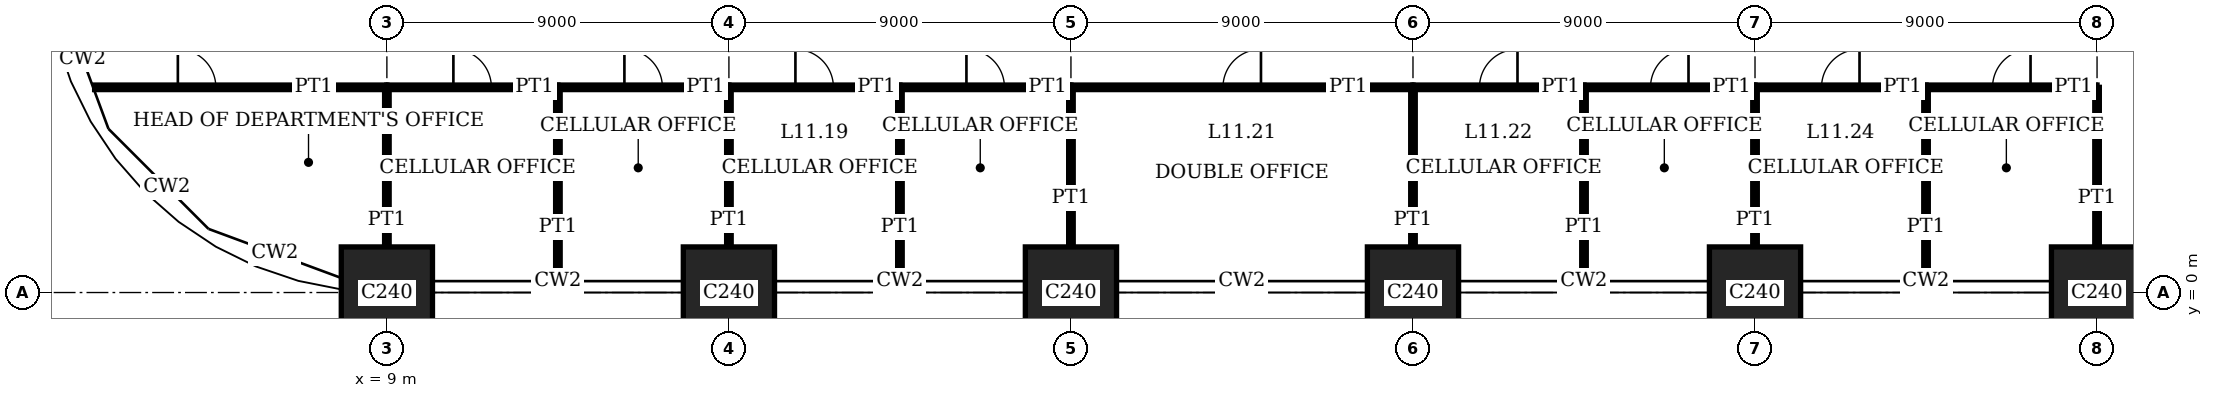
"""IFC4 building model, lengths in metres.
Left out: names, types, materials, properties, quantities, classifications, styles, units other than length and angle.
Written with IfcOpenShell. Run it as: python <this file> out.ifc"""

import sys

from ifc_helpers import new_model, si_unit, direction, frame, frame_2d, origin, origin_2d, place, context, subcontext, project, spatial, rectangle, extrude, element, fill, save


model = new_model("IFC4")
c1 = context("Model", 3, precision=1e-05, world=origin(), true_north=direction((0.0, 1.0)))
c2 = subcontext(c1, "Body", "Model", "MODEL_VIEW")
j1 = project(units=[si_unit("LENGTHUNIT", "METRE"), si_unit("PLANEANGLEUNIT", "RADIAN")], contexts=[c1])
p1 = place(None, origin())
s1 = spatial("IfcSite", under=j1, at=p1, CompositionType="ELEMENT")
p2 = place(p1, origin())
s2 = spatial("IfcBuilding", under=s1, at=p2, CompositionType="ELEMENT")
p3 = place(p2, frame((0.0, 0.0, 47.8)))
s3 = spatial("IfcBuildingStorey", under=s2, at=p3, CompositionType="ELEMENT", Elevation=47.8)
for number, where, z_axis, x_axis in (
    (1, (9.0, 0.0, 0.0), (0.0, 0.0, 1.0), (1.0, 0.0, 0.0)),
    (2, (18.0, 0.0, 0.0), (0.0, 0.0, 1.0), (1.0, 0.0, 0.0)),
    (3, (27.0, 0.0, 0.0), (0.0, 0.0, 1.0), (1.0, 0.0, 0.0)),
    (4, (36.0, 0.0, 0.0), (0.0, 0.0, 1.0), (1.0, 0.0, 0.0)),
    (5, (45.0, 0.0, 0.0), (0.0, 0.0, 1.0), (1.0, 0.0, 0.0)),
    (6, (54.0, 0.0, 0.0), (0.0, 0.0, 1.0), (1.0, 0.0, 0.0)),
):
    element("IfcColumn", number, at=place(p3, frame(where, z_axis=z_axis, x_axis=x_axis)), inside=s3, PredefinedType="COLUMN", context=c2, shape_type="SweptSolid", body=[
        extrude(rectangle(XDim=2.4, YDim=2.4, at=origin_2d()), origin(), (0.0, 0.0, 1.0), 4.0),
    ])
p4 = place(p3, frame((9.0, 5.4, 0.0), z_axis=(0.0, 0.0, 1.0), x_axis=(1.0, 0.0, 0.0)))
e7 = element("IfcWall", 7, at=p4, inside=s3, PredefinedType="PARTITIONING", context=c2, shape_type="SweptSolid", body=[
    extrude(rectangle(XDim=4.5, YDim=0.12, at=frame_2d((2.25, 0.0))), origin(), (0.0, 0.0, 1.0), 3.75),
])
p5 = place(p4, frame((1.75, 0.0, 0.0)))
e8 = element("IfcOpeningElement", 8, at=p5, cuts=e7, PredefinedType="OPENING", context=c2, shape_type="SweptSolid", body=[
    extrude(rectangle(XDim=1.0, YDim=2.4, at=frame_2d((0.5, 1.2))), frame((0.0, 0.07, 0.0), z_axis=(0.0, -1.0, 0.0), x_axis=(1.0, 0.0, 0.0)), (0.0, 0.0, 1.0), 0.14),
])
p6 = place(p3, frame((13.5, 5.4, 0.0), z_axis=(0.0, 0.0, 1.0), x_axis=(1.0, 0.0, 0.0)))
e9 = element("IfcWall", 9, at=p6, inside=s3, PredefinedType="PARTITIONING", context=c2, shape_type="SweptSolid", body=[
    extrude(rectangle(XDim=4.5, YDim=0.12, at=frame_2d((2.25, 0.0))), origin(), (0.0, 0.0, 1.0), 3.75),
])
p7 = place(p6, frame((1.75, 0.0, 0.0)))
e10 = element("IfcOpeningElement", 10, at=p7, cuts=e9, PredefinedType="OPENING", context=c2, shape_type="SweptSolid", body=[
    extrude(rectangle(XDim=1.0, YDim=2.4, at=frame_2d((0.5, 1.2))), frame((0.0, 0.07, 0.0), z_axis=(0.0, -1.0, 0.0), x_axis=(1.0, 0.0, 0.0)), (0.0, 0.0, 1.0), 0.14),
])
p8 = place(p3, frame((18.0, 5.4, 0.0), z_axis=(0.0, 0.0, 1.0), x_axis=(1.0, 0.0, 0.0)))
e11 = element("IfcWall", 11, at=p8, inside=s3, PredefinedType="PARTITIONING", context=c2, shape_type="SweptSolid", body=[
    extrude(rectangle(XDim=4.5, YDim=0.12, at=frame_2d((2.25, 0.0))), origin(), (0.0, 0.0, 1.0), 3.75),
])
p9 = place(p8, frame((1.75, 0.0, 0.0)))
e12 = element("IfcOpeningElement", 12, at=p9, cuts=e11, PredefinedType="OPENING", context=c2, shape_type="SweptSolid", body=[
    extrude(rectangle(XDim=1.0, YDim=2.4, at=frame_2d((0.5, 1.2))), frame((0.0, 0.07, 0.0), z_axis=(0.0, -1.0, 0.0), x_axis=(1.0, 0.0, 0.0)), (0.0, 0.0, 1.0), 0.14),
])
p10 = place(p3, frame((22.5, 5.4, 0.0), z_axis=(0.0, 0.0, 1.0), x_axis=(1.0, 0.0, 0.0)))
e13 = element("IfcWall", 13, at=p10, inside=s3, PredefinedType="PARTITIONING", context=c2, shape_type="SweptSolid", body=[
    extrude(rectangle(XDim=4.5, YDim=0.12, at=frame_2d((2.25, 0.0))), origin(), (0.0, 0.0, 1.0), 3.75),
])
p11 = place(p10, frame((1.75, 0.0, 0.0)))
e14 = element("IfcOpeningElement", 14, at=p11, cuts=e13, PredefinedType="OPENING", context=c2, shape_type="SweptSolid", body=[
    extrude(rectangle(XDim=1.0, YDim=2.4, at=frame_2d((0.5, 1.2))), frame((0.0, 0.07, 0.0), z_axis=(0.0, -1.0, 0.0), x_axis=(1.0, 0.0, 0.0)), (0.0, 0.0, 1.0), 0.14),
])
p12 = place(p3, frame((27.0, 5.4, 0.0), z_axis=(0.0, 0.0, 1.0), x_axis=(1.0, 0.0, 0.0)))
e15 = element("IfcWall", 15, at=p12, inside=s3, PredefinedType="PARTITIONING", context=c2, shape_type="SweptSolid", body=[
    extrude(rectangle(XDim=9.0, YDim=0.12, at=frame_2d((4.5, 0.0))), origin(), (0.0, 0.0, 1.0), 3.75),
])
p13 = place(p12, frame((4.0, 0.0, 0.0)))
e16 = element("IfcOpeningElement", 16, at=p13, cuts=e15, PredefinedType="OPENING", context=c2, shape_type="SweptSolid", body=[
    extrude(rectangle(XDim=1.0, YDim=2.4, at=frame_2d((0.5, 1.2))), frame((0.0, 0.07, 0.0), z_axis=(0.0, -1.0, 0.0), x_axis=(1.0, 0.0, 0.0)), (0.0, 0.0, 1.0), 0.14),
])
p14 = place(p3, frame((36.0, 5.4, 0.0), z_axis=(0.0, 0.0, 1.0), x_axis=(1.0, 0.0, 0.0)))
e17 = element("IfcWall", 17, at=p14, inside=s3, PredefinedType="PARTITIONING", context=c2, shape_type="SweptSolid", body=[
    extrude(rectangle(XDim=4.5, YDim=0.12, at=frame_2d((2.25, 0.0))), origin(), (0.0, 0.0, 1.0), 3.75),
])
p15 = place(p14, frame((1.75, 0.0, 0.0)))
e18 = element("IfcOpeningElement", 18, at=p15, cuts=e17, PredefinedType="OPENING", context=c2, shape_type="SweptSolid", body=[
    extrude(rectangle(XDim=1.0, YDim=2.4, at=frame_2d((0.5, 1.2))), frame((0.0, 0.07, 0.0), z_axis=(0.0, -1.0, 0.0), x_axis=(1.0, 0.0, 0.0)), (0.0, 0.0, 1.0), 0.14),
])
p16 = place(p3, frame((40.5, 5.4, 0.0), z_axis=(0.0, 0.0, 1.0), x_axis=(1.0, 0.0, 0.0)))
e19 = element("IfcWall", 19, at=p16, inside=s3, PredefinedType="PARTITIONING", context=c2, shape_type="SweptSolid", body=[
    extrude(rectangle(XDim=4.5, YDim=0.12, at=frame_2d((2.25, 0.0))), origin(), (0.0, 0.0, 1.0), 3.75),
])
p17 = place(p16, frame((1.75, 0.0, 0.0)))
e20 = element("IfcOpeningElement", 20, at=p17, cuts=e19, PredefinedType="OPENING", context=c2, shape_type="SweptSolid", body=[
    extrude(rectangle(XDim=1.0, YDim=2.4, at=frame_2d((0.5, 1.2))), frame((0.0, 0.07, 0.0), z_axis=(0.0, -1.0, 0.0), x_axis=(1.0, 0.0, 0.0)), (0.0, 0.0, 1.0), 0.14),
])
p18 = place(p3, frame((45.0, 5.4, 0.0), z_axis=(0.0, 0.0, 1.0), x_axis=(1.0, 0.0, 0.0)))
e21 = element("IfcWall", 21, at=p18, inside=s3, PredefinedType="PARTITIONING", context=c2, shape_type="SweptSolid", body=[
    extrude(rectangle(XDim=4.5, YDim=0.12, at=frame_2d((2.25, 0.0))), origin(), (0.0, 0.0, 1.0), 3.75),
])
p19 = place(p18, frame((1.75, 0.0, 0.0)))
e22 = element("IfcOpeningElement", 22, at=p19, cuts=e21, PredefinedType="OPENING", context=c2, shape_type="SweptSolid", body=[
    extrude(rectangle(XDim=1.0, YDim=2.4, at=frame_2d((0.5, 1.2))), frame((0.0, 0.07, 0.0), z_axis=(0.0, -1.0, 0.0), x_axis=(1.0, 0.0, 0.0)), (0.0, 0.0, 1.0), 0.14),
])
p20 = place(p3, frame((49.5, 5.4, 0.0), z_axis=(0.0, 0.0, 1.0), x_axis=(1.0, 0.0, 0.0)))
e23 = element("IfcWall", 23, at=p20, inside=s3, PredefinedType="PARTITIONING", context=c2, shape_type="SweptSolid", body=[
    extrude(rectangle(XDim=4.5, YDim=0.12, at=frame_2d((2.25, 0.0))), origin(), (0.0, 0.0, 1.0), 3.75),
])
p21 = place(p20, frame((1.75, 0.0, 0.0)))
e24 = element("IfcOpeningElement", 24, at=p21, cuts=e23, PredefinedType="OPENING", context=c2, shape_type="SweptSolid", body=[
    extrude(rectangle(XDim=1.0, YDim=2.4, at=frame_2d((0.5, 1.2))), frame((0.0, 0.07, 0.0), z_axis=(0.0, -1.0, 0.0), x_axis=(1.0, 0.0, 0.0)), (0.0, 0.0, 1.0), 0.14),
])
p22 = place(p3, frame((1.31, 5.4, 0.0), z_axis=(0.0, 0.0, 1.0), x_axis=(1.0, 0.0, 0.0)))
e25 = element("IfcWall", 25, at=p22, inside=s3, PredefinedType="PARTITIONING", context=c2, shape_type="SweptSolid", body=[
    extrude(rectangle(XDim=7.69, YDim=0.12, at=frame_2d((3.845, 0.0))), origin(), (0.0, 0.0, 1.0), 3.75),
])
p23 = place(p22, frame((2.19, 0.0, 0.0)))
e26 = element("IfcOpeningElement", 26, at=p23, cuts=e25, PredefinedType="OPENING", context=c2, shape_type="SweptSolid", body=[
    extrude(rectangle(XDim=1.0, YDim=2.4, at=frame_2d((0.5, 1.2))), frame((0.0, 0.07, 0.0), z_axis=(0.0, -1.0, 0.0), x_axis=(1.0, 0.0, 0.0)), (0.0, 0.0, 1.0), 0.14),
])
p24 = place(p3, frame((9.0, 1.2, 0.0), z_axis=(0.0, 0.0, 1.0), x_axis=(0.0, 1.0, 0.0)))
e27 = element("IfcWall", 27, at=p24, inside=s3, PredefinedType="PARTITIONING", context=c2, shape_type="SweptSolid", body=[
    extrude(rectangle(XDim=4.2, YDim=0.12, at=frame_2d((2.1, 0.0))), origin(), (0.0, 0.0, 1.0), 3.05),
])
p25 = place(p3, frame((13.5, 0.31, 0.0), z_axis=(0.0, 0.0, 1.0), x_axis=(0.0, 1.0, 0.0)))
e28 = element("IfcWall", 28, at=p25, inside=s3, PredefinedType="PARTITIONING", context=c2, shape_type="SweptSolid", body=[
    extrude(rectangle(XDim=5.09, YDim=0.12, at=frame_2d((2.545, 0.0))), origin(), (0.0, 0.0, 1.0), 3.75),
])
p26 = place(p3, frame((18.0, 1.2, 0.0), z_axis=(0.0, 0.0, 1.0), x_axis=(0.0, 1.0, 0.0)))
e29 = element("IfcWall", 29, at=p26, inside=s3, PredefinedType="PARTITIONING", context=c2, shape_type="SweptSolid", body=[
    extrude(rectangle(XDim=4.2, YDim=0.12, at=frame_2d((2.1, 0.0))), origin(), (0.0, 0.0, 1.0), 3.05),
])
p27 = place(p3, frame((22.5, 0.31, 0.0), z_axis=(0.0, 0.0, 1.0), x_axis=(0.0, 1.0, 0.0)))
e30 = element("IfcWall", 30, at=p27, inside=s3, PredefinedType="PARTITIONING", context=c2, shape_type="SweptSolid", body=[
    extrude(rectangle(XDim=5.09, YDim=0.12, at=frame_2d((2.545, 0.0))), origin(), (0.0, 0.0, 1.0), 3.75),
])
for number, where, z_axis, x_axis in (
    (31, (27.0, 1.2, 0.0), (0.0, 0.0, 1.0), (0.0, 1.0, 0.0)),
    (32, (36.0, 1.2, 0.0), (0.0, 0.0, 1.0), (0.0, 1.0, 0.0)),
):
    element("IfcWall", number, at=place(p3, frame(where, z_axis=z_axis, x_axis=x_axis)), inside=s3, PredefinedType="PARTITIONING", context=c2, shape_type="SweptSolid", body=[
        extrude(rectangle(XDim=4.2, YDim=0.12, at=frame_2d((2.1, 0.0))), origin(), (0.0, 0.0, 1.0), 3.05),
    ])
p28 = place(p3, frame((40.5, 0.31, 0.0), z_axis=(0.0, 0.0, 1.0), x_axis=(0.0, 1.0, 0.0)))
e33 = element("IfcWall", 33, at=p28, inside=s3, PredefinedType="PARTITIONING", context=c2, shape_type="SweptSolid", body=[
    extrude(rectangle(XDim=5.09, YDim=0.12, at=frame_2d((2.545, 0.0))), origin(), (0.0, 0.0, 1.0), 3.75),
])
p29 = place(p3, frame((45.0, 1.2, 0.0), z_axis=(0.0, 0.0, 1.0), x_axis=(0.0, 1.0, 0.0)))
e34 = element("IfcWall", 34, at=p29, inside=s3, PredefinedType="PARTITIONING", context=c2, shape_type="SweptSolid", body=[
    extrude(rectangle(XDim=4.2, YDim=0.12, at=frame_2d((2.1, 0.0))), origin(), (0.0, 0.0, 1.0), 3.05),
])
p30 = place(p3, frame((49.5, 0.31, 0.0), z_axis=(0.0, 0.0, 1.0), x_axis=(0.0, 1.0, 0.0)))
e35 = element("IfcWall", 35, at=p30, inside=s3, PredefinedType="PARTITIONING", context=c2, shape_type="SweptSolid", body=[
    extrude(rectangle(XDim=5.09, YDim=0.12, at=frame_2d((2.545, 0.0))), origin(), (0.0, 0.0, 1.0), 3.75),
])
p31 = place(p3, frame((54.0, 1.2, 0.0), z_axis=(0.0, 0.0, 1.0), x_axis=(0.0, 1.0, 0.0)))
e36 = element("IfcWall", 36, at=p31, inside=s3, PredefinedType="PARTITIONING", context=c2, shape_type="SweptSolid", body=[
    extrude(rectangle(XDim=4.2, YDim=0.12, at=frame_2d((2.1, 0.0))), origin(), (0.0, 0.0, 1.0), 3.05),
])
p32 = place(p5, origin())
e37 = element("IfcDoor", 37, at=p32, inside=s3, OperationType="SINGLE_SWING_RIGHT", PredefinedType="DOOR", context=c2, shape_type="SweptSolid", body=[
    extrude(rectangle(XDim=1.0, YDim=2.4, at=frame_2d((0.5, 1.2))), frame((0.0, 0.025, 0.0), z_axis=(0.0, -1.0, 0.0), x_axis=(1.0, 0.0, 0.0)), (0.0, 0.0, 1.0), 0.05),
])
fill(e8, e37)
p33 = place(p7, origin())
e38 = element("IfcDoor", 38, at=p33, inside=s3, OperationType="SINGLE_SWING_RIGHT", PredefinedType="DOOR", context=c2, shape_type="SweptSolid", body=[
    extrude(rectangle(XDim=1.0, YDim=2.4, at=frame_2d((0.5, 1.2))), frame((0.0, 0.025, 0.0), z_axis=(0.0, -1.0, 0.0), x_axis=(1.0, 0.0, 0.0)), (0.0, 0.0, 1.0), 0.05),
])
fill(e10, e38)
p34 = place(p9, origin())
e39 = element("IfcDoor", 39, at=p34, inside=s3, OperationType="SINGLE_SWING_RIGHT", PredefinedType="DOOR", context=c2, shape_type="SweptSolid", body=[
    extrude(rectangle(XDim=1.0, YDim=2.4, at=frame_2d((0.5, 1.2))), frame((0.0, 0.025, 0.0), z_axis=(0.0, -1.0, 0.0), x_axis=(1.0, 0.0, 0.0)), (0.0, 0.0, 1.0), 0.05),
])
fill(e12, e39)
p35 = place(p11, origin())
e40 = element("IfcDoor", 40, at=p35, inside=s3, OperationType="SINGLE_SWING_RIGHT", PredefinedType="DOOR", context=c2, shape_type="SweptSolid", body=[
    extrude(rectangle(XDim=1.0, YDim=2.4, at=frame_2d((0.5, 1.2))), frame((0.0, 0.025, 0.0), z_axis=(0.0, -1.0, 0.0), x_axis=(1.0, 0.0, 0.0)), (0.0, 0.0, 1.0), 0.05),
])
fill(e14, e40)
p36 = place(p13, origin())
e41 = element("IfcDoor", 41, at=p36, inside=s3, OperationType="SINGLE_SWING_LEFT", PredefinedType="DOOR", context=c2, shape_type="SweptSolid", body=[
    extrude(rectangle(XDim=1.0, YDim=2.4, at=frame_2d((0.5, 1.2))), frame((0.0, 0.025, 0.0), z_axis=(0.0, -1.0, 0.0), x_axis=(1.0, 0.0, 0.0)), (0.0, 0.0, 1.0), 0.05),
])
fill(e16, e41)
p37 = place(p15, origin())
e42 = element("IfcDoor", 42, at=p37, inside=s3, OperationType="SINGLE_SWING_LEFT", PredefinedType="DOOR", context=c2, shape_type="SweptSolid", body=[
    extrude(rectangle(XDim=1.0, YDim=2.4, at=frame_2d((0.5, 1.2))), frame((0.0, 0.025, 0.0), z_axis=(0.0, -1.0, 0.0), x_axis=(1.0, 0.0, 0.0)), (0.0, 0.0, 1.0), 0.05),
])
fill(e18, e42)
p38 = place(p17, origin())
e43 = element("IfcDoor", 43, at=p38, inside=s3, OperationType="SINGLE_SWING_LEFT", PredefinedType="DOOR", context=c2, shape_type="SweptSolid", body=[
    extrude(rectangle(XDim=1.0, YDim=2.4, at=frame_2d((0.5, 1.2))), frame((0.0, 0.025, 0.0), z_axis=(0.0, -1.0, 0.0), x_axis=(1.0, 0.0, 0.0)), (0.0, 0.0, 1.0), 0.05),
])
fill(e20, e43)
p39 = place(p19, origin())
e44 = element("IfcDoor", 44, at=p39, inside=s3, OperationType="SINGLE_SWING_LEFT", PredefinedType="DOOR", context=c2, shape_type="SweptSolid", body=[
    extrude(rectangle(XDim=1.0, YDim=2.4, at=frame_2d((0.5, 1.2))), frame((0.0, 0.025, 0.0), z_axis=(0.0, -1.0, 0.0), x_axis=(1.0, 0.0, 0.0)), (0.0, 0.0, 1.0), 0.05),
])
fill(e22, e44)
p40 = place(p21, origin())
e45 = element("IfcDoor", 45, at=p40, inside=s3, OperationType="SINGLE_SWING_LEFT", PredefinedType="DOOR", context=c2, shape_type="SweptSolid", body=[
    extrude(rectangle(XDim=1.0, YDim=2.4, at=frame_2d((0.5, 1.2))), frame((0.0, 0.025, 0.0), z_axis=(0.0, -1.0, 0.0), x_axis=(1.0, 0.0, 0.0)), (0.0, 0.0, 1.0), 0.05),
])
fill(e24, e45)
p41 = place(p23, origin())
e46 = element("IfcDoor", 46, at=p41, inside=s3, OperationType="SINGLE_SWING_RIGHT", PredefinedType="DOOR", context=c2, shape_type="SweptSolid", body=[
    extrude(rectangle(XDim=1.0, YDim=2.4, at=frame_2d((0.5, 1.2))), frame((0.0, 0.025, 0.0), z_axis=(0.0, -1.0, 0.0), x_axis=(1.0, 0.0, 0.0)), (0.0, 0.0, 1.0), 0.05),
])
fill(e26, e46)
save(model, sys.argv[1])
